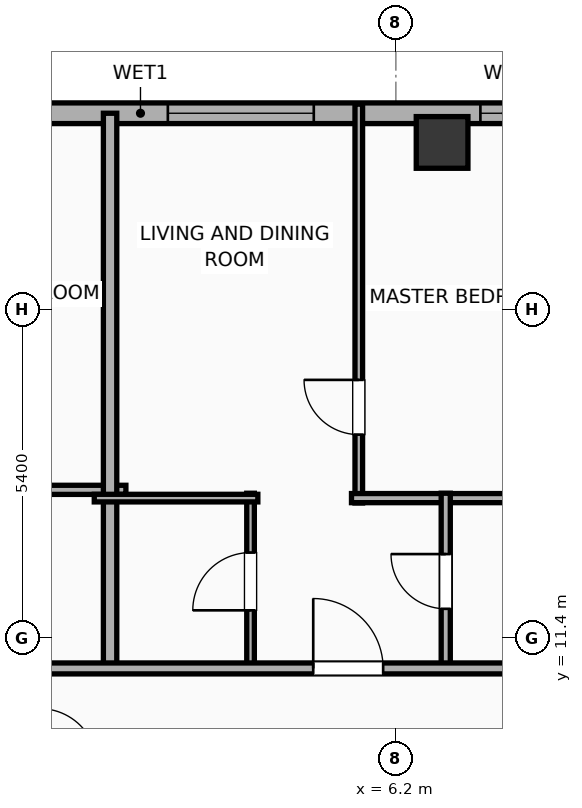
"""IFC4 building model, lengths in metres.
Left out: names, types, materials, properties, quantities, classifications, styles, units other than length and angle.
Written with IfcOpenShell. Run it as: python <this file> out.ifc"""

import sys

from ifc_helpers import new_model, si_unit, direction, frame, frame_2d, origin, origin_2d, place, context, subcontext, project, spatial, rectangle, hollow_rectangle, extrude, element, fill, save


model = new_model("IFC4")
c1 = context("Model", 3, precision=1e-05, world=origin(), true_north=direction((0.0, 1.0)))
c2 = subcontext(c1, "Body", "Model", "MODEL_VIEW")
j1 = project(units=[si_unit("LENGTHUNIT", "METRE"), si_unit("PLANEANGLEUNIT", "RADIAN")], contexts=[c1])
p1 = place(None, origin())
s1 = spatial("IfcSite", under=j1, at=p1, CompositionType="ELEMENT")
p2 = place(p1, origin())
s2 = spatial("IfcBuilding", under=s1, at=p2, CompositionType="ELEMENT")
p3 = place(p2, frame((0.0, 0.0, 243.1)))
s3 = spatial("IfcBuildingStorey", under=s2, at=p3, CompositionType="ELEMENT", Elevation=243.1)
p4 = place(p3, frame((6.96, 19.55, 0.0), z_axis=(0.0, 0.0, 1.0), x_axis=(1.0, 0.0, 0.0)))
e1 = element("IfcColumn", 1, at=p4, inside=s3, PredefinedType="COLUMN", context=c2, shape_type="SweptSolid", body=[
    extrude(hollow_rectangle(XDim=0.85, YDim=0.85, WallThickness=0.028, at=origin_2d()), origin(), (0.0, 0.0, 1.0), 3.9),
])
p5 = place(p3, frame((-22.783, 20.03, 0.0), z_axis=(0.0, 0.0, 1.0), x_axis=(1.0, 0.0, 0.0)))
e2 = element("IfcWall", 2, at=p5, inside=s3, PredefinedType="ELEMENTEDWALL", context=c2, shape_type="SweptSolid", body=[
    extrude(rectangle(XDim=49.566, YDim=0.34, at=frame_2d((24.783, 0.0))), origin(), (0.0, 0.0, 1.0), 3.65),
])
p6 = place(p5, frame((6.211, 0.0, 0.75)))
e3 = element("IfcOpeningElement", 3, at=p6, cuts=e2, PredefinedType="OPENING", context=c2, shape_type="SweptSolid", body=[
    extrude(rectangle(XDim=2.4, YDim=2.1, at=frame_2d((1.2, 1.05))), frame((0.0, 0.18, 0.0), z_axis=(0.0, -1.0, 0.0), x_axis=(1.0, 0.0, 0.0)), (0.0, 0.0, 1.0), 0.36),
])
p7 = place(p5, frame((25.233, 0.0, 0.75)))
e4 = element("IfcOpeningElement", 4, at=p7, cuts=e2, PredefinedType="OPENING", context=c2, shape_type="SweptSolid", body=[
    extrude(rectangle(XDim=2.4, YDim=2.1, at=frame_2d((1.2, 1.05))), frame((0.0, 0.18, 0.0), z_axis=(0.0, -1.0, 0.0), x_axis=(1.0, 0.0, 0.0)), (0.0, 0.0, 1.0), 0.36),
])
p8 = place(p5, frame((3.511, 0.0, 0.75)))
e5 = element("IfcOpeningElement", 5, at=p8, cuts=e2, PredefinedType="OPENING", context=c2, shape_type="SweptSolid", body=[
    extrude(rectangle(XDim=1.2, YDim=2.05, at=frame_2d((0.6, 1.025))), frame((0.0, 0.18, 0.0), z_axis=(0.0, -1.0, 0.0), x_axis=(1.0, 0.0, 0.0)), (0.0, 0.0, 1.0), 0.36),
])
p9 = place(p5, frame((10.728, 0.0, 0.75)))
e6 = element("IfcOpeningElement", 6, at=p9, cuts=e2, PredefinedType="OPENING", context=c2, shape_type="SweptSolid", body=[
    extrude(rectangle(XDim=1.2, YDim=2.05, at=frame_2d((0.6, 1.025))), frame((0.0, 0.18, 0.0), z_axis=(0.0, -1.0, 0.0), x_axis=(1.0, 0.0, 0.0)), (0.0, 0.0, 1.0), 0.36),
])
p10 = place(p5, frame((14.478, 0.0, 0.75)))
e7 = element("IfcOpeningElement", 7, at=p10, cuts=e2, PredefinedType="OPENING", context=c2, shape_type="SweptSolid", body=[
    extrude(rectangle(XDim=1.2, YDim=2.05, at=frame_2d((0.6, 1.025))), frame((0.0, 0.18, 0.0), z_axis=(0.0, -1.0, 0.0), x_axis=(1.0, 0.0, 0.0)), (0.0, 0.0, 1.0), 0.36),
])
p11 = place(p5, frame((17.988, 0.0, 0.75)))
e8 = element("IfcOpeningElement", 8, at=p11, cuts=e2, PredefinedType="OPENING", context=c2, shape_type="SweptSolid", body=[
    extrude(rectangle(XDim=1.2, YDim=2.05, at=frame_2d((0.6, 1.025))), frame((0.0, 0.18, 0.0), z_axis=(0.0, -1.0, 0.0), x_axis=(1.0, 0.0, 0.0)), (0.0, 0.0, 1.0), 0.36),
])
p12 = place(p5, frame((21.978, 0.0, 0.75)))
e9 = element("IfcOpeningElement", 9, at=p12, cuts=e2, PredefinedType="OPENING", context=c2, shape_type="SweptSolid", body=[
    extrude(rectangle(XDim=1.2, YDim=2.05, at=frame_2d((0.6, 1.025))), frame((0.0, 0.18, 0.0), z_axis=(0.0, -1.0, 0.0), x_axis=(1.0, 0.0, 0.0)), (0.0, 0.0, 1.0), 0.36),
])
p13 = place(p5, frame((30.373, 0.0, 0.75)))
e10 = element("IfcOpeningElement", 10, at=p13, cuts=e2, PredefinedType="OPENING", context=c2, shape_type="SweptSolid", body=[
    extrude(rectangle(XDim=0.85, YDim=2.05, at=frame_2d((0.425, 1.025))), frame((0.0, 0.18, 0.0), z_axis=(0.0, -1.0, 0.0), x_axis=(1.0, 0.0, 0.0)), (0.0, 0.0, 1.0), 0.36),
])
p14 = place(p5, frame((33.228, 0.0, 0.75)))
e11 = element("IfcOpeningElement", 11, at=p14, cuts=e2, PredefinedType="OPENING", context=c2, shape_type="SweptSolid", body=[
    extrude(rectangle(XDim=1.2, YDim=2.05, at=frame_2d((0.6, 1.025))), frame((0.0, 0.18, 0.0), z_axis=(0.0, -1.0, 0.0), x_axis=(1.0, 0.0, 0.0)), (0.0, 0.0, 1.0), 0.36),
])
p15 = place(p5, frame((36.978, 0.0, 0.75)))
e12 = element("IfcOpeningElement", 12, at=p15, cuts=e2, PredefinedType="OPENING", context=c2, shape_type="SweptSolid", body=[
    extrude(rectangle(XDim=1.2, YDim=2.05, at=frame_2d((0.6, 1.025))), frame((0.0, 0.18, 0.0), z_axis=(0.0, -1.0, 0.0), x_axis=(1.0, 0.0, 0.0)), (0.0, 0.0, 1.0), 0.36),
])
p16 = place(p5, frame((40.412, 0.0, 0.75)))
e13 = element("IfcOpeningElement", 13, at=p16, cuts=e2, PredefinedType="OPENING", context=c2, shape_type="SweptSolid", body=[
    extrude(rectangle(XDim=1.2, YDim=2.05, at=frame_2d((0.6, 1.025))), frame((0.0, 0.18, 0.0), z_axis=(0.0, -1.0, 0.0), x_axis=(1.0, 0.0, 0.0)), (0.0, 0.0, 1.0), 0.36),
])
p17 = place(p5, frame((43.846, 0.0, 0.75)))
e14 = element("IfcOpeningElement", 14, at=p17, cuts=e2, PredefinedType="OPENING", context=c2, shape_type="SweptSolid", body=[
    extrude(rectangle(XDim=1.2, YDim=2.05, at=frame_2d((0.6, 1.025))), frame((0.0, 0.18, 0.0), z_axis=(0.0, -1.0, 0.0), x_axis=(1.0, 0.0, 0.0)), (0.0, 0.0, 1.0), 0.36),
])
p18 = place(p5, frame((46.814, 0.0, 0.75)))
e15 = element("IfcOpeningElement", 15, at=p18, cuts=e2, PredefinedType="OPENING", context=c2, shape_type="SweptSolid", body=[
    extrude(rectangle(XDim=1.2, YDim=2.05, at=frame_2d((0.6, 1.025))), frame((0.0, 0.18, 0.0), z_axis=(0.0, -1.0, 0.0), x_axis=(1.0, 0.0, 0.0)), (0.0, 0.0, 1.0), 0.36),
])
p19 = place(p3, frame((-2.03, 13.837, 0.0), z_axis=(0.0, 0.0, 1.0), x_axis=(1.0, 0.0, 0.0)))
e16 = element("IfcWall", 16, at=p19, inside=s3, PredefinedType="PLUMBINGWALL", context=c2, shape_type="SweptSolid", body=[
    extrude(rectangle(XDim=3.79, YDim=0.15, at=frame_2d((1.895, 0.0))), origin(), (0.0, 0.0, 1.0), 3.65),
])
p20 = place(p3, frame((1.5, 10.82, 0.0), z_axis=(0.0, 0.0, 1.0), x_axis=(0.0, 1.0, 0.0)))
e17 = element("IfcWall", 17, at=p20, inside=s3, PredefinedType="PARTITIONING", context=c2, shape_type="SweptSolid", body=[
    extrude(rectangle(XDim=9.21, YDim=0.22, at=frame_2d((4.605, 0.0))), origin(), (0.0, 0.0, 1.0), 3.65),
])
p21 = place(p3, frame((5.59, 13.621, 0.0), z_axis=(0.0, 0.0, 1.0), x_axis=(0.0, 1.0, 0.0)))
e18 = element("IfcWall", 18, at=p21, inside=s3, PredefinedType="PARTITIONING", context=c2, shape_type="SweptSolid", body=[
    extrude(rectangle(XDim=6.559, YDim=0.125, at=frame_2d((3.279, 0.0))), origin(), (0.0, 0.0, 1.0), 3.09),
])
p22 = place(p21, frame((1.124, 0.0, 0.0)))
e19 = element("IfcOpeningElement", 19, at=p22, cuts=e18, PredefinedType="OPENING", context=c2, shape_type="SweptSolid", body=[
    extrude(rectangle(XDim=0.9, YDim=2.05, at=frame_2d((0.45, 1.025))), frame((0.0, 0.073, 0.0), z_axis=(0.0, -1.0, 0.0), x_axis=(1.0, 0.0, 0.0)), (0.0, 0.0, 1.0), 0.145),
])
p23 = place(p3, frame((5.47, 13.701, 0.0), z_axis=(0.0, 0.0, 1.0), x_axis=(1.0, 0.0, 0.0)))
e20 = element("IfcWall", 20, at=p23, inside=s3, PredefinedType="PLUMBINGWALL", context=c2, shape_type="SweptSolid", body=[
    extrude(rectangle(XDim=3.79, YDim=0.15, at=frame_2d((1.895, 0.0))), origin(), (0.0, 0.0, 1.0), 3.65),
])
p24 = place(p3, frame((3.81, 10.88, 0.0), z_axis=(0.0, 0.0, 1.0), x_axis=(0.0, 1.0, 0.0)))
e21 = element("IfcWall", 21, at=p24, inside=s3, PredefinedType="PARTITIONING", context=c2, shape_type="SweptSolid", body=[
    extrude(rectangle(XDim=2.901, YDim=0.125, at=frame_2d((1.451, 0.0))), origin(), (0.0, 0.0, 1.0), 3.65),
])
p25 = place(p24, frame((0.976, 0.0, 0.0)))
e22 = element("IfcOpeningElement", 22, at=p25, cuts=e21, PredefinedType="OPENING", context=c2, shape_type="SweptSolid", body=[
    extrude(rectangle(XDim=0.95, YDim=2.05, at=frame_2d((0.475, 1.025))), frame((0.0, 0.073, 0.0), z_axis=(0.0, -1.0, 0.0), x_axis=(1.0, 0.0, 0.0)), (0.0, 0.0, 1.0), 0.145),
])
p26 = place(p3, frame((1.24, 13.701, 0.0), z_axis=(0.0, 0.0, 1.0), x_axis=(1.0, 0.0, 0.0)))
e23 = element("IfcWall", 23, at=p26, inside=s3, PredefinedType="PARTITIONING", context=c2, shape_type="SweptSolid", body=[
    extrude(rectangle(XDim=2.69, YDim=0.125, at=frame_2d((1.345, 0.0))), origin(), (0.0, 0.0, 1.0), 3.65),
])
p27 = place(p3, frame((7.02, 10.88, 0.0), z_axis=(0.0, 0.0, 1.0), x_axis=(0.0, 1.0, 0.0)))
e24 = element("IfcWall", 24, at=p27, inside=s3, PredefinedType="PLUMBINGWALL", context=c2, shape_type="SweptSolid", body=[
    extrude(rectangle(XDim=2.901, YDim=0.15, at=frame_2d((1.451, 0.0))), origin(), (0.0, 0.0, 1.0), 3.65),
])
p28 = place(p27, frame((1.0, 0.0, 0.0)))
e25 = element("IfcOpeningElement", 25, at=p28, cuts=e24, PredefinedType="OPENING", context=c2, shape_type="SweptSolid", body=[
    extrude(rectangle(XDim=0.9, YDim=2.05, at=frame_2d((0.45, 1.025))), frame((0.0, 0.085, 0.0), z_axis=(0.0, -1.0, 0.0), x_axis=(1.0, 0.0, 0.0)), (0.0, 0.0, 1.0), 0.17),
])
p29 = place(p3, frame((-26.23, 10.9, 0.0), z_axis=(0.0, 0.0, 1.0), x_axis=(1.0, 0.0, 0.0)))
e26 = element("IfcWall", 26, at=p29, inside=s3, PredefinedType="PARTITIONING", context=c2, shape_type="SweptSolid", body=[
    extrude(rectangle(XDim=56.46, YDim=0.18, at=frame_2d((28.23, 0.0))), origin(), (0.0, 0.0, 1.0), 3.65),
])
p30 = place(p29, frame((2.825, 0.0, 0.0)))
e27 = element("IfcOpeningElement", 27, at=p30, cuts=e26, PredefinedType="OPENING", context=c2, shape_type="SweptSolid", body=[
    extrude(rectangle(XDim=0.9, YDim=2.05, at=frame_2d((0.45, 1.025))), frame((0.0, 0.1, 0.0), z_axis=(0.0, -1.0, 0.0), x_axis=(1.0, 0.0, 0.0)), (0.0, 0.0, 1.0), 0.2),
])
p31 = place(p29, frame((10.135, 0.0, 0.0)))
e28 = element("IfcOpeningElement", 28, at=p31, cuts=e26, PredefinedType="OPENING", context=c2, shape_type="SweptSolid", body=[
    extrude(rectangle(XDim=1.15, YDim=2.05, at=frame_2d((0.575, 1.025))), frame((0.0, 0.1, 0.0), z_axis=(0.0, -1.0, 0.0), x_axis=(1.0, 0.0, 0.0)), (0.0, 0.0, 1.0), 0.2),
])
p32 = place(p29, frame((16.069, 0.0, 0.0)))
e29 = element("IfcOpeningElement", 29, at=p32, cuts=e26, PredefinedType="OPENING", context=c2, shape_type="SweptSolid", body=[
    extrude(rectangle(XDim=1.15, YDim=2.05, at=frame_2d((0.575, 1.025))), frame((0.0, 0.1, 0.0), z_axis=(0.0, -1.0, 0.0), x_axis=(1.0, 0.0, 0.0)), (0.0, 0.0, 1.0), 0.2),
])
p33 = place(p29, frame((23.567, 0.0, 0.0)))
e30 = element("IfcOpeningElement", 30, at=p33, cuts=e26, PredefinedType="OPENING", context=c2, shape_type="SweptSolid", body=[
    extrude(rectangle(XDim=1.15, YDim=2.05, at=frame_2d((0.575, 1.025))), frame((0.0, 0.1, 0.0), z_axis=(0.0, -1.0, 0.0), x_axis=(1.0, 0.0, 0.0)), (0.0, 0.0, 1.0), 0.2),
])
p34 = place(p29, frame((31.071, 0.0, 0.0)))
e31 = element("IfcOpeningElement", 31, at=p34, cuts=e26, PredefinedType="OPENING", context=c2, shape_type="SweptSolid", body=[
    extrude(rectangle(XDim=1.15, YDim=2.05, at=frame_2d((0.575, 1.025))), frame((0.0, 0.1, 0.0), z_axis=(0.0, -1.0, 0.0), x_axis=(1.0, 0.0, 0.0)), (0.0, 0.0, 1.0), 0.2),
])
p35 = place(p29, frame((38.569, 0.0, 0.0)))
e32 = element("IfcOpeningElement", 32, at=p35, cuts=e26, PredefinedType="OPENING", context=c2, shape_type="SweptSolid", body=[
    extrude(rectangle(XDim=1.15, YDim=2.05, at=frame_2d((0.575, 1.025))), frame((0.0, 0.1, 0.0), z_axis=(0.0, -1.0, 0.0), x_axis=(1.0, 0.0, 0.0)), (0.0, 0.0, 1.0), 0.2),
])
p36 = place(p29, frame((45.881, 0.0, 0.0)))
e33 = element("IfcOpeningElement", 33, at=p36, cuts=e26, PredefinedType="OPENING", context=c2, shape_type="SweptSolid", body=[
    extrude(rectangle(XDim=0.9, YDim=2.05, at=frame_2d((0.45, 1.025))), frame((0.0, 0.1, 0.0), z_axis=(0.0, -1.0, 0.0), x_axis=(1.0, 0.0, 0.0)), (0.0, 0.0, 1.0), 0.2),
])
p37 = place(p29, frame((52.775, 0.0, 0.0)))
e34 = element("IfcOpeningElement", 34, at=p37, cuts=e26, PredefinedType="OPENING", context=c2, shape_type="SweptSolid", body=[
    extrude(rectangle(XDim=0.9, YDim=2.05, at=frame_2d((0.45, 1.025))), frame((0.0, 0.1, 0.0), z_axis=(0.0, -1.0, 0.0), x_axis=(1.0, 0.0, 0.0)), (0.0, 0.0, 1.0), 0.2),
])
p38 = place(p7, origin())
e35 = element("IfcWindow", 35, at=p38, inside=s3, PartitioningType="SINGLE_PANEL", PredefinedType="WINDOW", context=c2, shape_type="SweptSolid", body=[
    extrude(rectangle(XDim=2.4, YDim=2.1, at=frame_2d((1.2, 1.05))), frame((0.0, 0.03, 0.0), z_axis=(0.0, -1.0, 0.0), x_axis=(1.0, 0.0, 0.0)), (0.0, 0.0, 1.0), 0.06),
])
fill(e4, e35)
p39 = place(p13, origin())
e36 = element("IfcWindow", 36, at=p39, inside=s3, PartitioningType="SINGLE_PANEL", PredefinedType="WINDOW", context=c2, shape_type="SweptSolid", body=[
    extrude(rectangle(XDim=0.85, YDim=2.05, at=frame_2d((0.425, 1.025))), frame((0.0, 0.03, 0.0), z_axis=(0.0, -1.0, 0.0), x_axis=(1.0, 0.0, 0.0)), (0.0, 0.0, 1.0), 0.06),
])
fill(e10, e36)
p40 = place(p22, origin())
e37 = element("IfcDoor", 37, at=p40, inside=s3, OperationType="SINGLE_SWING_RIGHT", PredefinedType="DOOR", context=c2, shape_type="SweptSolid", body=[
    extrude(rectangle(XDim=0.9, YDim=2.05, at=frame_2d((0.45, 1.025))), frame((0.0, 0.025, 0.0), z_axis=(0.0, -1.0, 0.0), x_axis=(1.0, 0.0, 0.0)), (0.0, 0.0, 1.0), 0.05),
])
fill(e19, e37)
p41 = place(p25, origin())
e38 = element("IfcDoor", 38, at=p41, inside=s3, OperationType="SINGLE_SWING_LEFT", PredefinedType="DOOR", context=c2, shape_type="SweptSolid", body=[
    extrude(rectangle(XDim=0.95, YDim=2.05, at=frame_2d((0.475, 1.025))), frame((0.0, 0.025, 0.0), z_axis=(0.0, -1.0, 0.0), x_axis=(1.0, 0.0, 0.0)), (0.0, 0.0, 1.0), 0.05),
])
fill(e22, e38)
p42 = place(p28, origin())
e39 = element("IfcDoor", 39, at=p42, inside=s3, OperationType="SINGLE_SWING_RIGHT", PredefinedType="DOOR", context=c2, shape_type="SweptSolid", body=[
    extrude(rectangle(XDim=0.9, YDim=2.05, at=frame_2d((0.45, 1.025))), frame((0.0, 0.025, 0.0), z_axis=(0.0, -1.0, 0.0), x_axis=(1.0, 0.0, 0.0)), (0.0, 0.0, 1.0), 0.05),
])
fill(e25, e39)
p43 = place(p34, origin())
e40 = element("IfcDoor", 40, at=p43, inside=s3, OperationType="SINGLE_SWING_LEFT", PredefinedType="DOOR", context=c2, shape_type="SweptSolid", body=[
    extrude(rectangle(XDim=1.15, YDim=2.05, at=frame_2d((0.575, 1.025))), frame((0.0, 0.025, 0.0), z_axis=(0.0, -1.0, 0.0), x_axis=(1.0, 0.0, 0.0)), (0.0, 0.0, 1.0), 0.05),
])
fill(e31, e40)
save(model, sys.argv[1])
